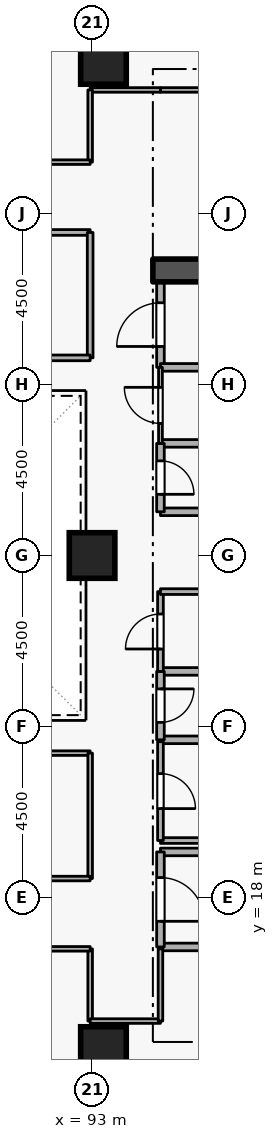
"""IFC4 building model, lengths in metres.
Left out: names, types, materials, properties, quantities, classifications, styles, units other than length and angle.
Written with IfcOpenShell. Run it as: python <this file> out.ifc"""

import sys

from ifc_helpers import new_model, si_unit, direction, frame, frame_2d, origin, origin_2d, place, context, subcontext, project, spatial, rectangle, extrude, element, fill, save


model = new_model("IFC4")
c1 = context("Model", 3, precision=1e-05, world=origin(), true_north=direction((0.0, 1.0)))
c2 = subcontext(c1, "Body", "Model", "MODEL_VIEW")
j1 = project(units=[si_unit("LENGTHUNIT", "METRE"), si_unit("PLANEANGLEUNIT", "RADIAN")], contexts=[c1])
p1 = place(None, origin())
s1 = spatial("IfcSite", under=j1, at=p1, CompositionType="ELEMENT")
p2 = place(p1, origin())
s2 = spatial("IfcBuilding", under=s1, at=p2, CompositionType="ELEMENT")
p3 = place(p2, frame((0.0, 0.0, 90.9)))
s3 = spatial("IfcBuildingStorey", under=s2, at=p3, CompositionType="ELEMENT", Elevation=90.9)
p4 = place(p3, frame((94.6, 34.5, 0.0), z_axis=(0.0, 0.0, 1.0), x_axis=(1.0, 0.0, 0.0)))
e1 = element("IfcWall", 1, at=p4, inside=s3, PredefinedType="SHEAR", context=c2, shape_type="SweptSolid", body=[
    extrude(rectangle(XDim=5.7, YDim=0.6, at=frame_2d((2.85, 0.0))), origin(), (0.0, 0.0, 1.0), 3.6),
])
for number, where, z_axis, x_axis in (
    (2, (93.3, 14.0, 0.0), (0.0, 0.0, 1.0), (1.0, 0.0, 0.0)),
    (3, (93.3, 40.0, 0.0), (0.0, 0.0, 1.0), (1.0, 0.0, 0.0)),
    (4, (93.0, 27.0, 0.0), (0.0, 0.0, 1.0), (1.0, 0.0, 0.0)),
):
    element("IfcColumn", number, at=place(p3, frame(where, z_axis=z_axis, x_axis=x_axis)), inside=s3, PredefinedType="COLUMN", context=c2, shape_type="SweptSolid", body=[
        extrude(rectangle(XDim=1.2, YDim=1.2, at=origin_2d()), origin(), (0.0, 0.0, 1.0), 3.6),
    ])
p5 = place(p3, frame((94.8, 16.7, 0.0), z_axis=(0.0, 0.0, 1.0), x_axis=(1.0, 0.0, 0.0)))
e5 = element("IfcWall", 5, at=p5, inside=s3, PredefinedType="STANDARD", context=c2, shape_type="SweptSolid", body=[
    extrude(rectangle(XDim=5.7, YDim=0.2, at=frame_2d((2.85, 0.0))), origin(), (0.0, 0.0, 1.0), 3.34),
])
p6 = place(p3, frame((97.1, 19.2, 0.0), z_axis=(0.0, 0.0, 1.0), x_axis=(-1.0, 0.0, 0.0)))
e6 = element("IfcWall", 6, at=p6, inside=s3, PredefinedType="STANDARD", context=c2, shape_type="SweptSolid", body=[
    extrude(rectangle(XDim=2.3, YDim=0.2, at=frame_2d((1.15, 0.0))), origin(), (0.0, 0.0, 1.0), 2.545),
])
p7 = place(p3, frame((94.8, 19.2, 0.0), z_axis=(0.0, 0.0, 1.0), x_axis=(0.0, -1.0, 0.0)))
e7 = element("IfcWall", 7, at=p7, inside=s3, PredefinedType="STANDARD", context=c2, shape_type="SweptSolid", body=[
    extrude(rectangle(XDim=2.5, YDim=0.2, at=frame_2d((1.25, 0.0))), origin(), (0.0, 0.0, 1.0), 3.34),
])
p8 = place(p7, frame((0.675, 0.0, 0.0)))
e8 = element("IfcOpeningElement", 8, at=p8, cuts=e7, PredefinedType="OPENING", context=c2, shape_type="SweptSolid", body=[
    extrude(rectangle(XDim=1.15, YDim=2.1, at=frame_2d((0.575, 1.05))), frame((0.0, 0.11, 0.0), z_axis=(0.0, -1.0, 0.0), x_axis=(1.0, 0.0, 0.0)), (0.0, 0.0, 1.0), 0.22),
])
for number, where, z_axis, x_axis in (
    (9, (94.8, 28.15, 0.0), (0.0, 0.0, 1.0), (1.0, 0.0, 0.0)),
    (10, (96.85, 29.95, 0.0), (0.0, 0.0, 1.0), (-1.0, 0.0, 0.0)),
):
    element("IfcWall", number, at=place(p3, frame(where, z_axis=z_axis, x_axis=x_axis)), inside=s3, PredefinedType="STANDARD", context=c2, shape_type="SweptSolid", body=[
        extrude(rectangle(XDim=2.05, YDim=0.2, at=frame_2d((1.025, 0.0))), origin(), (0.0, 0.0, 1.0), 3.34),
    ])
p9 = place(p3, frame((94.8, 29.95, 0.0), z_axis=(0.0, 0.0, 1.0), x_axis=(0.0, -1.0, 0.0)))
e11 = element("IfcWall", 11, at=p9, inside=s3, PredefinedType="STANDARD", context=c2, shape_type="SweptSolid", body=[
    extrude(rectangle(XDim=1.8, YDim=0.2, at=frame_2d((0.9, 0.0))), origin(), (0.0, 0.0, 1.0), 3.34),
])
p10 = place(p9, frame((0.46, 0.0, 0.0)))
e12 = element("IfcOpeningElement", 12, at=p10, cuts=e11, PredefinedType="OPENING", context=c2, shape_type="SweptSolid", body=[
    extrude(rectangle(XDim=0.88, YDim=2.04, at=frame_2d((0.44, 1.02))), frame((0.0, 0.11, 0.0), z_axis=(0.0, -1.0, 0.0), x_axis=(1.0, 0.0, 0.0)), (0.0, 0.0, 1.0), 0.22),
])
for number, where, z_axis, x_axis in (
    (13, (94.8, 22.15, 0.0), (0.0, 0.0, 1.0), (1.0, 0.0, 0.0)),
    (14, (96.85, 23.95, 0.0), (0.0, 0.0, 1.0), (-1.0, 0.0, 0.0)),
):
    element("IfcWall", number, at=place(p3, frame(where, z_axis=z_axis, x_axis=x_axis)), inside=s3, PredefinedType="STANDARD", context=c2, shape_type="SweptSolid", body=[
        extrude(rectangle(XDim=2.05, YDim=0.2, at=frame_2d((1.025, 0.0))), origin(), (0.0, 0.0, 1.0), 3.34),
    ])
p11 = place(p3, frame((94.8, 23.95, 0.0), z_axis=(0.0, 0.0, 1.0), x_axis=(0.0, -1.0, 0.0)))
e15 = element("IfcWall", 15, at=p11, inside=s3, PredefinedType="STANDARD", context=c2, shape_type="SweptSolid", body=[
    extrude(rectangle(XDim=1.8, YDim=0.2, at=frame_2d((0.9, 0.0))), origin(), (0.0, 0.0, 1.0), 3.34),
])
p12 = place(p11, frame((0.46, 0.0, 0.0)))
e16 = element("IfcOpeningElement", 16, at=p12, cuts=e15, PredefinedType="OPENING", context=c2, shape_type="SweptSolid", body=[
    extrude(rectangle(XDim=0.88, YDim=2.04, at=frame_2d((0.44, 1.02))), frame((0.0, 0.11, 0.0), z_axis=(0.0, -1.0, 0.0), x_axis=(1.0, 0.0, 0.0)), (0.0, 0.0, 1.0), 0.22),
])
p13 = place(p3, frame((94.8, 31.95, 0.0), z_axis=(0.0, 0.0, 1.0), x_axis=(0.0, 1.0, 0.0)))
e17 = element("IfcWall", 17, at=p13, inside=s3, PredefinedType="STANDARD", context=c2, shape_type="SweptSolid", body=[
    extrude(rectangle(XDim=2.25, YDim=0.2, at=frame_2d((1.125, 0.0))), origin(), (0.0, 0.0, 1.0), 3.34),
])
p14 = place(p13, frame((0.55, 0.0, 0.0)))
e18 = element("IfcOpeningElement", 18, at=p14, cuts=e17, PredefinedType="OPENING", context=c2, shape_type="SweptSolid", body=[
    extrude(rectangle(XDim=1.15, YDim=2.1, at=frame_2d((0.575, 1.05))), frame((0.0, 0.11, 0.0), z_axis=(0.0, -1.0, 0.0), x_axis=(1.0, 0.0, 0.0)), (0.0, 0.0, 1.0), 0.22),
])
p15 = place(p3, frame((96.85, 31.95, 0.0), z_axis=(0.0, 0.0, 1.0), x_axis=(-1.0, 0.0, 0.0)))
e19 = element("IfcWall", 19, at=p15, inside=s3, PredefinedType="STANDARD", context=c2, shape_type="SweptSolid", body=[
    extrude(rectangle(XDim=2.05, YDim=0.2, at=frame_2d((1.025, 0.0))), origin(), (0.0, 0.0, 1.0), 3.34),
])
p16 = place(p3, frame((94.8, 19.5, 0.0), z_axis=(0.0, 0.0, 1.0), x_axis=(1.0, 0.0, 0.0)))
e20 = element("IfcWall", 20, at=p16, inside=s3, PredefinedType="PARTITIONING", context=c2, shape_type="SweptSolid", body=[
    extrude(rectangle(XDim=2.05, YDim=0.15, at=frame_2d((1.025, 0.0))), origin(), (0.0, 0.0, 1.0), 2.545),
])
p17 = place(p3, frame((94.8, 22.1, 0.0), z_axis=(0.0, 0.0, 1.0), x_axis=(0.0, -1.0, 0.0)))
e21 = element("IfcWall", 21, at=p17, inside=s3, PredefinedType="PARTITIONING", context=c2, shape_type="SweptSolid", body=[
    extrude(rectangle(XDim=2.6, YDim=0.15, at=frame_2d((1.3, 0.0))), origin(), (0.0, 0.0, 1.0), 3.34),
])
p18 = place(p17, frame((0.84, 0.0, 0.0)))
e22 = element("IfcOpeningElement", 22, at=p18, cuts=e21, PredefinedType="OPENING", context=c2, shape_type="SweptSolid", body=[
    extrude(rectangle(XDim=0.92, YDim=2.08, at=frame_2d((0.46, 1.04))), frame((0.0, 0.085, 0.0), z_axis=(0.0, -1.0, 0.0), x_axis=(1.0, 0.0, 0.0)), (0.0, 0.0, 1.0), 0.17),
])
p19 = place(p3, frame((94.8, 23.95, 0.0), z_axis=(0.0, 0.0, 1.0), x_axis=(0.0, 1.0, 0.0)))
e23 = element("IfcWall", 23, at=p19, inside=s3, PredefinedType="PARTITIONING", context=c2, shape_type="SweptSolid", body=[
    extrude(rectangle(XDim=2.1, YDim=0.15, at=frame_2d((1.05, 0.0))), origin(), (0.0, 0.0, 1.0), 3.34),
])
p20 = place(p19, frame((0.59, 0.0, 0.0)))
e24 = element("IfcOpeningElement", 24, at=p20, cuts=e23, PredefinedType="OPENING", context=c2, shape_type="SweptSolid", body=[
    extrude(rectangle(XDim=0.92, YDim=2.08, at=frame_2d((0.46, 1.04))), frame((0.0, 0.085, 0.0), z_axis=(0.0, -1.0, 0.0), x_axis=(1.0, 0.0, 0.0)), (0.0, 0.0, 1.0), 0.17),
])
p21 = place(p3, frame((94.8, 26.05, 0.0), z_axis=(0.0, 0.0, 1.0), x_axis=(1.0, 0.0, 0.0)))
e25 = element("IfcWall", 25, at=p21, inside=s3, PredefinedType="PARTITIONING", context=c2, shape_type="SweptSolid", body=[
    extrude(rectangle(XDim=2.05, YDim=0.15, at=frame_2d((1.025, 0.0))), origin(), (0.0, 0.0, 1.0), 3.34),
])
p22 = place(p3, frame((94.8, 29.95, 0.0), z_axis=(0.0, 0.0, 1.0), x_axis=(0.0, 1.0, 0.0)))
e26 = element("IfcWall", 26, at=p22, inside=s3, PredefinedType="PARTITIONING", context=c2, shape_type="SweptSolid", body=[
    extrude(rectangle(XDim=2.0, YDim=0.1, at=frame_2d((1.0, 0.0))), origin(), (0.0, 0.0, 1.0), 3.34),
])
p23 = place(p22, frame((0.525, 0.0, 0.0)))
e27 = element("IfcOpeningElement", 27, at=p23, cuts=e26, PredefinedType="OPENING", context=c2, shape_type="SweptSolid", body=[
    extrude(rectangle(XDim=0.95, YDim=2.1, at=frame_2d((0.475, 1.05))), frame((0.0, 0.06, 0.0), z_axis=(0.0, -1.0, 0.0), x_axis=(1.0, 0.0, 0.0)), (0.0, 0.0, 1.0), 0.12),
])
p24 = place(p3, frame((92.95, 16.65, 0.0), z_axis=(0.0, 0.0, 1.0), x_axis=(0.0, -1.0, 0.0)))
e28 = element("IfcWall", 28, at=p24, inside=s3, PredefinedType="PARTITIONING", context=c2, shape_type="SweptSolid", body=[
    extrude(rectangle(XDim=1.9, YDim=0.12, at=frame_2d((0.95, 0.0))), origin(), (0.0, 0.0, 1.0), 3.34),
])
p25 = place(p3, frame((92.95, 14.75, 0.0), z_axis=(0.0, 0.0, 1.0), x_axis=(1.0, 0.0, 0.0)))
e29 = element("IfcWall", 29, at=p25, inside=s3, PredefinedType="PARTITIONING", context=c2, shape_type="SweptSolid", body=[
    extrude(rectangle(XDim=1.85, YDim=0.12, at=frame_2d((0.925, 0.0))), origin(), (0.0, 0.0, 1.0), 3.34),
])
p26 = place(p3, frame((94.8, 14.75, 0.0), z_axis=(0.0, 0.0, 1.0), x_axis=(0.0, 1.0, 0.0)))
e30 = element("IfcWall", 30, at=p26, inside=s3, PredefinedType="PARTITIONING", context=c2, shape_type="SweptSolid", body=[
    extrude(rectangle(XDim=1.9, YDim=0.12, at=frame_2d((0.95, 0.0))), origin(), (0.0, 0.0, 1.0), 3.34),
])
p27 = place(p3, frame((88.5, 16.65, 0.0), z_axis=(0.0, 0.0, 1.0), x_axis=(1.0, 0.0, 0.0)))
e31 = element("IfcWall", 31, at=p27, inside=s3, PredefinedType="PARTITIONING", context=c2, shape_type="SweptSolid", body=[
    extrude(rectangle(XDim=4.45, YDim=0.12, at=frame_2d((2.225, 0.0))), origin(), (0.0, 0.0, 1.0), 3.34),
])
p28 = place(p27, frame((1.7, 0.0, 0.0)))
e32 = element("IfcOpeningElement", 32, at=p28, cuts=e31, PredefinedType="OPENING", context=c2, shape_type="SweptSolid", body=[
    extrude(rectangle(XDim=1.05, YDim=2.1, at=frame_2d((0.525, 1.05))), frame((0.0, 0.07, 0.0), z_axis=(0.0, -1.0, 0.0), x_axis=(1.0, 0.0, 0.0)), (0.0, 0.0, 1.0), 0.14),
])
p29 = place(p3, frame((97.95, 39.25, 0.0), z_axis=(0.0, 0.0, 1.0), x_axis=(-1.0, 0.0, 0.0)))
e33 = element("IfcWall", 33, at=p29, inside=s3, PredefinedType="PARTITIONING", context=c2, shape_type="SweptSolid", body=[
    extrude(rectangle(XDim=3.15, YDim=0.12, at=frame_2d((1.575, 0.0))), origin(), (0.0, 0.0, 1.0), 3.34),
])
p30 = place(p3, frame((94.8, 39.25, 0.0), z_axis=(0.0, 0.0, 1.0), x_axis=(-1.0, 0.0, 0.0)))
e34 = element("IfcWall", 34, at=p30, inside=s3, PredefinedType="PARTITIONING", context=c2, shape_type="SweptSolid", body=[
    extrude(rectangle(XDim=1.85, YDim=0.12, at=frame_2d((0.925, 0.0))), origin(), (0.0, 0.0, 1.0), 3.34),
])
p31 = place(p3, frame((92.95, 39.25, 0.0), z_axis=(0.0, 0.0, 1.0), x_axis=(0.0, -1.0, 0.0)))
e35 = element("IfcWall", 35, at=p31, inside=s3, PredefinedType="PARTITIONING", context=c2, shape_type="SweptSolid", body=[
    extrude(rectangle(XDim=1.9, YDim=0.12, at=frame_2d((0.95, 0.0))), origin(), (0.0, 0.0, 1.0), 3.34),
])
p32 = place(p3, frame((92.95, 37.35, 0.0), z_axis=(0.0, 0.0, 1.0), x_axis=(-1.0, 0.0, 0.0)))
e36 = element("IfcWall", 36, at=p32, inside=s3, PredefinedType="PARTITIONING", context=c2, shape_type="SweptSolid", body=[
    extrude(rectangle(XDim=4.45, YDim=0.12, at=frame_2d((2.225, 0.0))), origin(), (0.0, 0.0, 1.0), 3.34),
])
p33 = place(p32, frame((1.7, 0.0, 0.0)))
e37 = element("IfcOpeningElement", 37, at=p33, cuts=e36, PredefinedType="OPENING", context=c2, shape_type="SweptSolid", body=[
    extrude(rectangle(XDim=1.05, YDim=2.1, at=frame_2d((0.525, 1.05))), frame((0.0, 0.07, 0.0), z_axis=(0.0, -1.0, 0.0), x_axis=(1.0, 0.0, 0.0)), (0.0, 0.0, 1.0), 0.14),
])
p34 = place(p3, frame((84.05, 35.5, 0.0), z_axis=(0.0, 0.0, 1.0), x_axis=(1.0, 0.0, 0.0)))
e38 = element("IfcWall", 38, at=p34, inside=s3, PredefinedType="PARTITIONING", context=c2, shape_type="SweptSolid", body=[
    extrude(rectangle(XDim=8.9, YDim=0.15, at=frame_2d((4.45, 0.0))), origin(), (0.0, 0.0, 1.0), 3.34),
])
p35 = place(p34, frame((3.8, 0.0, 0.0)))
e39 = element("IfcOpeningElement", 39, at=p35, cuts=e38, PredefinedType="OPENING", context=c2, shape_type="SweptSolid", body=[
    extrude(rectangle(XDim=1.3, YDim=2.12, at=frame_2d((0.65, 1.06))), frame((0.0, 0.085, 0.0), z_axis=(0.0, -1.0, 0.0), x_axis=(1.0, 0.0, 0.0)), (0.0, 0.0, 1.0), 0.17),
])
p36 = place(p3, frame((92.95, 35.5, 0.0), z_axis=(0.0, 0.0, 1.0), x_axis=(0.0, -1.0, 0.0)))
e40 = element("IfcWall", 40, at=p36, inside=s3, PredefinedType="PARTITIONING", context=c2, shape_type="SweptSolid", body=[
    extrude(rectangle(XDim=3.3, YDim=0.15, at=frame_2d((1.65, 0.0))), origin(), (0.0, 0.0, 1.0), 3.34),
])
p37 = place(p3, frame((92.95, 32.2, 0.0), z_axis=(0.0, 0.0, 1.0), x_axis=(-1.0, 0.0, 0.0)))
e41 = element("IfcWall", 41, at=p37, inside=s3, PredefinedType="PARTITIONING", context=c2, shape_type="SweptSolid", body=[
    extrude(rectangle(XDim=8.9, YDim=0.15, at=frame_2d((4.45, 0.0))), origin(), (0.0, 0.0, 1.0), 3.34),
])
p38 = place(p3, frame((84.05, 21.8, 0.0), z_axis=(0.0, 0.0, 1.0), x_axis=(1.0, 0.0, 0.0)))
e42 = element("IfcWall", 42, at=p38, inside=s3, PredefinedType="PARTITIONING", context=c2, shape_type="SweptSolid", body=[
    extrude(rectangle(XDim=8.9, YDim=0.12, at=frame_2d((4.45, 0.0))), origin(), (0.0, 0.0, 1.0), 3.34),
])
p39 = place(p3, frame((92.95, 21.8, 0.0), z_axis=(0.0, 0.0, 1.0), x_axis=(0.0, -1.0, 0.0)))
e43 = element("IfcWall", 43, at=p39, inside=s3, PredefinedType="PARTITIONING", context=c2, shape_type="SweptSolid", body=[
    extrude(rectangle(XDim=3.3, YDim=0.12, at=frame_2d((1.65, 0.0))), origin(), (0.0, 0.0, 1.0), 3.34),
])
p40 = place(p3, frame((92.95, 18.5, 0.0), z_axis=(0.0, 0.0, 1.0), x_axis=(-1.0, 0.0, 0.0)))
e44 = element("IfcWall", 44, at=p40, inside=s3, PredefinedType="PARTITIONING", context=c2, shape_type="SweptSolid", body=[
    extrude(rectangle(XDim=8.9, YDim=0.12, at=frame_2d((4.45, 0.0))), origin(), (0.0, 0.0, 1.0), 3.34),
])
p41 = place(p40, frame((3.975, 0.0, 0.0)))
e45 = element("IfcOpeningElement", 45, at=p41, cuts=e44, PredefinedType="OPENING", context=c2, shape_type="SweptSolid", body=[
    extrude(rectangle(XDim=0.95, YDim=2.1, at=frame_2d((0.475, 1.05))), frame((0.0, 0.07, 0.0), z_axis=(0.0, -1.0, 0.0), x_axis=(1.0, 0.0, 0.0)), (0.0, 0.0, 1.0), 0.14),
])
p42 = place(p8, origin())
e46 = element("IfcDoor", 46, at=p42, inside=s3, OperationType="SINGLE_SWING_RIGHT", PredefinedType="DOOR", context=c2, shape_type="SweptSolid", body=[
    extrude(rectangle(XDim=1.15, YDim=2.1, at=frame_2d((0.575, 1.05))), frame((0.0, 0.025, 0.0), z_axis=(0.0, -1.0, 0.0), x_axis=(1.0, 0.0, 0.0)), (0.0, 0.0, 1.0), 0.05),
])
fill(e8, e46)
p43 = place(p10, origin())
e47 = element("IfcDoor", 47, at=p43, inside=s3, OperationType="SINGLE_SWING_RIGHT", PredefinedType="DOOR", context=c2, shape_type="SweptSolid", body=[
    extrude(rectangle(XDim=0.88, YDim=2.04, at=frame_2d((0.44, 1.02))), frame((0.0, 0.025, 0.0), z_axis=(0.0, -1.0, 0.0), x_axis=(1.0, 0.0, 0.0)), (0.0, 0.0, 1.0), 0.05),
])
fill(e12, e47)
p44 = place(p12, origin())
e48 = element("IfcDoor", 48, at=p44, inside=s3, OperationType="SINGLE_SWING_LEFT", PredefinedType="DOOR", context=c2, shape_type="SweptSolid", body=[
    extrude(rectangle(XDim=0.88, YDim=2.04, at=frame_2d((0.44, 1.02))), frame((0.0, 0.025, 0.0), z_axis=(0.0, -1.0, 0.0), x_axis=(1.0, 0.0, 0.0)), (0.0, 0.0, 1.0), 0.05),
])
fill(e16, e48)
p45 = place(p18, origin())
e49 = element("IfcDoor", 49, at=p45, inside=s3, OperationType="SINGLE_SWING_RIGHT", PredefinedType="DOOR", context=c2, shape_type="SweptSolid", body=[
    extrude(rectangle(XDim=0.92, YDim=2.08, at=frame_2d((0.46, 1.04))), frame((0.0, 0.025, 0.0), z_axis=(0.0, -1.0, 0.0), x_axis=(1.0, 0.0, 0.0)), (0.0, 0.0, 1.0), 0.05),
])
fill(e22, e49)
p46 = place(p20, origin())
e50 = element("IfcDoor", 50, at=p46, inside=s3, OperationType="SINGLE_SWING_LEFT", PredefinedType="DOOR", context=c2, shape_type="SweptSolid", body=[
    extrude(rectangle(XDim=0.92, YDim=2.08, at=frame_2d((0.46, 1.04))), frame((0.0, 0.025, 0.0), z_axis=(0.0, -1.0, 0.0), x_axis=(1.0, 0.0, 0.0)), (0.0, 0.0, 1.0), 0.05),
])
fill(e24, e50)
p47 = place(p23, origin())
e51 = element("IfcDoor", 51, at=p47, inside=s3, OperationType="SINGLE_SWING_RIGHT", PredefinedType="DOOR", context=c2, shape_type="SweptSolid", body=[
    extrude(rectangle(XDim=0.95, YDim=2.1, at=frame_2d((0.475, 1.05))), frame((0.0, 0.025, 0.0), z_axis=(0.0, -1.0, 0.0), x_axis=(1.0, 0.0, 0.0)), (0.0, 0.0, 1.0), 0.05),
])
fill(e27, e51)
p48 = place(p14, origin())
e52 = element("IfcDoor", 52, at=p48, inside=s3, OperationType="SINGLE_SWING_LEFT", PredefinedType="DOOR", context=c2, shape_type="SweptSolid", body=[
    extrude(rectangle(XDim=1.15, YDim=2.1, at=frame_2d((0.575, 1.05))), frame((0.0, 0.025, 0.0), z_axis=(0.0, -1.0, 0.0), x_axis=(1.0, 0.0, 0.0)), (0.0, 0.0, 1.0), 0.05),
])
fill(e18, e52)
save(model, sys.argv[1])
